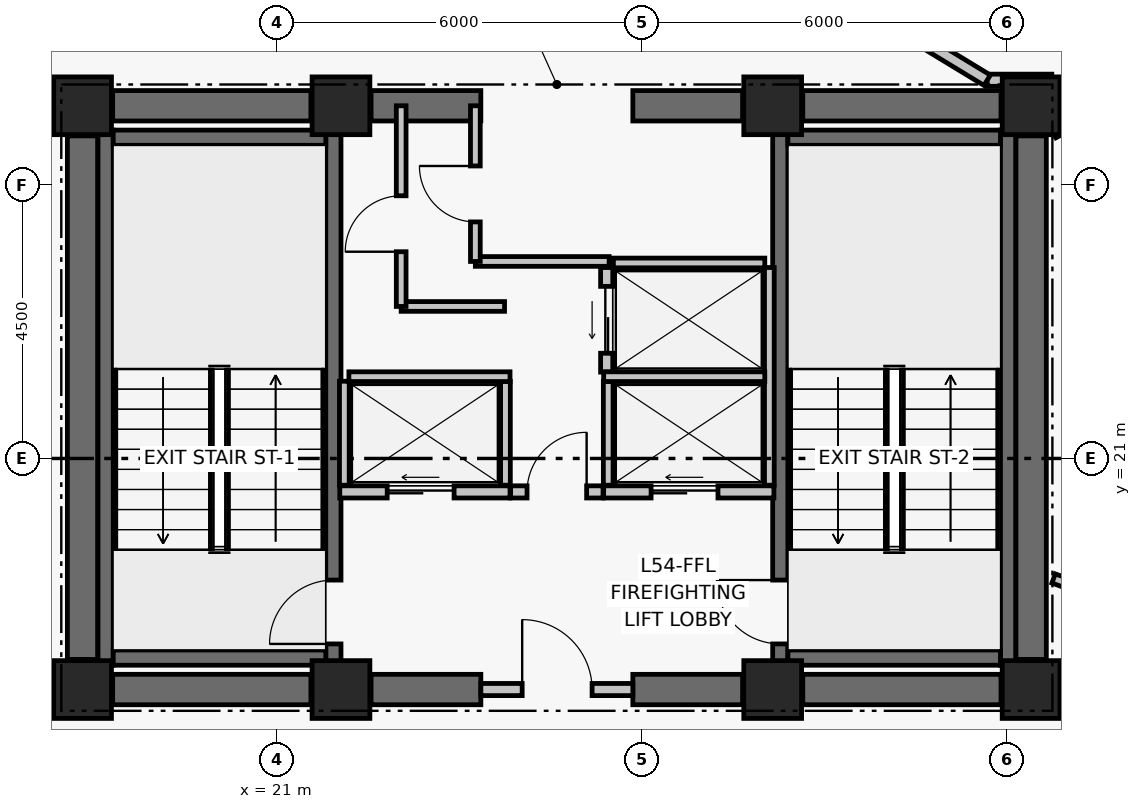
"""IFC4 building model, lengths in metres.
Left out: names, types, materials, properties, quantities, classifications, styles, units other than length and angle.
Written with IfcOpenShell. Run it as: python <this file> out.ifc"""

import sys

from ifc_helpers import new_model, si_unit, direction, frame, frame_2d, origin, origin_2d, place, context, subcontext, project, spatial, rectangle, extrude, element, fill, save


model = new_model("IFC4")
c1 = context("Model", 3, precision=1e-05, world=origin(), true_north=direction((0.0, 1.0)))
c2 = subcontext(c1, "Body", "Model", "MODEL_VIEW")
j1 = project(units=[si_unit("LENGTHUNIT", "METRE"), si_unit("PLANEANGLEUNIT", "RADIAN")], contexts=[c1])
p1 = place(None, origin())
s1 = spatial("IfcSite", under=j1, at=p1, CompositionType="ELEMENT")
p2 = place(p1, origin())
s2 = spatial("IfcBuilding", under=s1, at=p2, CompositionType="ELEMENT")
p3 = place(p2, frame((0.0, 0.0, 213.84)))
s3 = spatial("IfcBuildingStorey", under=s2, at=p3, CompositionType="ELEMENT", Elevation=213.84)
for number, where, z_axis, x_axis in (
    (1, (17.8, 17.2, 0.0), (0.0, 0.0, 1.0), (1.0, 0.0, 0.0)),
    (2, (22.05, 17.2, 0.0), (0.0, 0.0, 1.0), (1.0, 0.0, 0.0)),
    (3, (29.15, 17.2, 0.0), (0.0, 0.0, 1.0), (1.0, 0.0, 0.0)),
    (4, (33.4, 17.2, 0.0), (0.0, 0.0, 1.0), (1.0, 0.0, 0.0)),
    (5, (17.8, 26.8, 0.0), (0.0, 0.0, 1.0), (1.0, 0.0, 0.0)),
    (6, (22.05, 26.8, 0.0), (0.0, 0.0, 1.0), (1.0, 0.0, 0.0)),
    (7, (29.15, 26.8, 0.0), (0.0, 0.0, 1.0), (1.0, 0.0, 0.0)),
    (8, (33.4, 26.8, 0.0), (0.0, 0.0, 1.0), (1.0, 0.0, 0.0)),
):
    element("IfcColumn", number, at=place(p3, frame(where, z_axis=z_axis, x_axis=x_axis)), inside=s3, PredefinedType="COLUMN", context=c2, shape_type="SweptSolid", body=[
        extrude(rectangle(XDim=0.95, YDim=0.95, at=origin_2d()), origin(), (0.0, 0.0, 1.0), 5.7),
    ])
p4 = place(p3, frame((18.295, 17.2, 0.0), z_axis=(0.0, 0.0, 1.0), x_axis=(1.0, 0.0, 0.0)))
e9 = element("IfcWall", 9, at=p4, inside=s3, PredefinedType="SHEAR", context=c2, shape_type="SweptSolid", body=[
    extrude(rectangle(XDim=3.26, YDim=0.5, at=frame_2d((1.63, 0.0))), origin(), (0.0, 0.0, 1.0), 5.48),
])
p5 = place(p3, frame((22.545, 17.2, 0.0), z_axis=(0.0, 0.0, 1.0), x_axis=(1.0, 0.0, 0.0)))
e10 = element("IfcWall", 10, at=p5, inside=s3, PredefinedType="SHEAR", context=c2, shape_type="SweptSolid", body=[
    extrude(rectangle(XDim=1.805, YDim=0.5, at=frame_2d((0.903, 0.0))), origin(), (0.0, 0.0, 1.0), 5.48),
])
p6 = place(p3, frame((26.85, 17.2, 0.0), z_axis=(0.0, 0.0, 1.0), x_axis=(1.0, 0.0, 0.0)))
e11 = element("IfcWall", 11, at=p6, inside=s3, PredefinedType="SHEAR", context=c2, shape_type="SweptSolid", body=[
    extrude(rectangle(XDim=1.805, YDim=0.5, at=frame_2d((0.902, 0.0))), origin(), (0.0, 0.0, 1.0), 5.48),
])
for number, where, z_axis, x_axis in (
    (12, (29.645, 17.2, 0.0), (0.0, 0.0, 1.0), (1.0, 0.0, 0.0)),
    (13, (18.295, 26.8, 0.0), (0.0, 0.0, 1.0), (1.0, 0.0, 0.0)),
):
    element("IfcWall", number, at=place(p3, frame(where, z_axis=z_axis, x_axis=x_axis)), inside=s3, PredefinedType="SHEAR", context=c2, shape_type="SweptSolid", body=[
        extrude(rectangle(XDim=3.26, YDim=0.5, at=frame_2d((1.63, 0.0))), origin(), (0.0, 0.0, 1.0), 5.48),
    ])
p7 = place(p3, frame((22.545, 26.8, 0.0), z_axis=(0.0, 0.0, 1.0), x_axis=(1.0, 0.0, 0.0)))
e14 = element("IfcWall", 14, at=p7, inside=s3, PredefinedType="SHEAR", context=c2, shape_type="SweptSolid", body=[
    extrude(rectangle(XDim=1.805, YDim=0.5, at=frame_2d((0.903, 0.0))), origin(), (0.0, 0.0, 1.0), 5.48),
])
p8 = place(p3, frame((26.85, 26.8, 0.0), z_axis=(0.0, 0.0, 1.0), x_axis=(1.0, 0.0, 0.0)))
e15 = element("IfcWall", 15, at=p8, inside=s3, PredefinedType="SHEAR", context=c2, shape_type="SweptSolid", body=[
    extrude(rectangle(XDim=1.805, YDim=0.5, at=frame_2d((0.902, 0.0))), origin(), (0.0, 0.0, 1.0), 5.48),
])
p9 = place(p3, frame((29.645, 26.8, 0.0), z_axis=(0.0, 0.0, 1.0), x_axis=(1.0, 0.0, 0.0)))
e16 = element("IfcWall", 16, at=p9, inside=s3, PredefinedType="SHEAR", context=c2, shape_type="SweptSolid", body=[
    extrude(rectangle(XDim=3.26, YDim=0.5, at=frame_2d((1.63, 0.0))), origin(), (0.0, 0.0, 1.0), 5.48),
])
for number, where, z_axis, x_axis in (
    (17, (17.8, 17.695, 0.0), (0.0, 0.0, 1.0), (0.0, 1.0, 0.0)),
    (18, (33.4, 17.695, 0.0), (0.0, 0.0, 1.0), (0.0, 1.0, 0.0)),
):
    element("IfcWall", number, at=place(p3, frame(where, z_axis=z_axis, x_axis=x_axis)), inside=s3, PredefinedType="SHEAR", context=c2, shape_type="SweptSolid", body=[
        extrude(rectangle(XDim=8.61, YDim=0.5, at=frame_2d((4.305, 0.0))), origin(), (0.0, 0.0, 1.0), 5.48),
    ])
p10 = place(p3, frame((18.179, 17.6, 0.0), z_axis=(0.0, 0.0, 1.0), x_axis=(0.0, 1.0, 0.0)))
e19 = element("IfcWall", 19, at=p10, inside=s3, PredefinedType="SHEAR", context=c2, shape_type="SweptSolid", body=[
    extrude(rectangle(XDim=8.8, YDim=0.25, at=frame_2d((4.4, 0.0))), origin(), (0.0, 0.0, 1.0), 5.48),
])
p11 = place(p3, frame((21.925, 17.6, 0.0), z_axis=(0.0, 0.0, 1.0), x_axis=(0.0, 1.0, 0.0)))
e20 = element("IfcWall", 20, at=p11, inside=s3, PredefinedType="SHEAR", context=c2, shape_type="SweptSolid", body=[
    extrude(rectangle(XDim=8.8, YDim=0.25, at=frame_2d((4.4, 0.0))), origin(), (0.0, 0.0, 1.0), 5.48),
])
p12 = place(p11, frame((0.35, 0.0, 0.0)))
e21 = element("IfcOpeningElement", 21, at=p12, cuts=e20, PredefinedType="OPENING", context=c2, shape_type="SweptSolid", body=[
    extrude(rectangle(XDim=1.05, YDim=2.08, at=frame_2d((0.525, 1.04))), frame((0.0, 0.135, 0.0), z_axis=(0.0, -1.0, 0.0), x_axis=(1.0, 0.0, 0.0)), (0.0, 0.0, 1.0), 0.27),
])
for number, where, z_axis, x_axis in (
    (22, (18.304, 17.725, 0.0), (0.0, 0.0, 1.0), (1.0, 0.0, 0.0)),
    (23, (18.304, 26.275, 0.0), (0.0, 0.0, 1.0), (1.0, 0.0, 0.0)),
):
    element("IfcWall", number, at=place(p3, frame(where, z_axis=z_axis, x_axis=x_axis)), inside=s3, PredefinedType="SHEAR", context=c2, shape_type="SweptSolid", body=[
        extrude(rectangle(XDim=3.496, YDim=0.25, at=frame_2d((1.748, 0.0))), origin(), (0.0, 0.0, 1.0), 5.48),
    ])
p13 = place(p3, frame((29.275, 17.6, 0.0), z_axis=(0.0, 0.0, 1.0), x_axis=(0.0, 1.0, 0.0)))
e24 = element("IfcWall", 24, at=p13, inside=s3, PredefinedType="SHEAR", context=c2, shape_type="SweptSolid", body=[
    extrude(rectangle(XDim=8.8, YDim=0.25, at=frame_2d((4.4, 0.0))), origin(), (0.0, 0.0, 1.0), 5.48),
])
p14 = place(p13, frame((0.35, 0.0, 0.0)))
e25 = element("IfcOpeningElement", 25, at=p14, cuts=e24, PredefinedType="OPENING", context=c2, shape_type="SweptSolid", body=[
    extrude(rectangle(XDim=1.05, YDim=2.08, at=frame_2d((0.525, 1.04))), frame((0.0, 0.135, 0.0), z_axis=(0.0, -1.0, 0.0), x_axis=(1.0, 0.0, 0.0)), (0.0, 0.0, 1.0), 0.27),
])
p15 = place(p3, frame((33.021, 17.6, 0.0), z_axis=(0.0, 0.0, 1.0), x_axis=(0.0, 1.0, 0.0)))
e26 = element("IfcWall", 26, at=p15, inside=s3, PredefinedType="SHEAR", context=c2, shape_type="SweptSolid", body=[
    extrude(rectangle(XDim=8.8, YDim=0.25, at=frame_2d((4.4, 0.0))), origin(), (0.0, 0.0, 1.0), 5.48),
])
for number, where, z_axis, x_axis in (
    (27, (29.4, 17.725, 0.0), (0.0, 0.0, 1.0), (1.0, 0.0, 0.0)),
    (28, (29.4, 26.275, 0.0), (0.0, 0.0, 1.0), (1.0, 0.0, 0.0)),
):
    element("IfcWall", number, at=place(p3, frame(where, z_axis=z_axis, x_axis=x_axis)), inside=s3, PredefinedType="SHEAR", context=c2, shape_type="SweptSolid", body=[
        extrude(rectangle(XDim=3.496, YDim=0.25, at=frame_2d((1.748, 0.0))), origin(), (0.0, 0.0, 1.0), 5.48),
    ])
p16 = place(p3, frame((24.35, 17.2, 0.0), z_axis=(0.0, 0.0, 1.0), x_axis=(1.0, 0.0, 0.0)))
e29 = element("IfcWall", 29, at=p16, inside=s3, PredefinedType="PARTITIONING", context=c2, shape_type="SweptSolid", body=[
    extrude(rectangle(XDim=2.5, YDim=0.2, at=frame_2d((1.25, 0.0))), origin(), (0.0, 0.0, 1.0), 4.61),
])
p17 = place(p16, frame((0.68, 0.0, 0.0)))
e30 = element("IfcOpeningElement", 30, at=p17, cuts=e29, PredefinedType="OPENING", context=c2, shape_type="SweptSolid", body=[
    extrude(rectangle(XDim=1.15, YDim=2.08, at=frame_2d((0.575, 1.04))), frame((0.0, 0.11, 0.0), z_axis=(0.0, -1.0, 0.0), x_axis=(1.0, 0.0, 0.0)), (0.0, 0.0, 1.0), 0.22),
])
p18 = place(p3, frame((24.84, 20.45, 0.0), z_axis=(0.0, 0.0, 1.0), x_axis=(1.0, 0.0, 0.0)))
e31 = element("IfcWall", 31, at=p18, inside=s3, PredefinedType="PARTITIONING", context=c2, shape_type="SweptSolid", body=[
    extrude(rectangle(XDim=1.52, YDim=0.2, at=frame_2d((0.76, 0.0))), origin(), (0.0, 0.0, 1.0), 5.48),
])
p19 = place(p18, frame((0.27, 0.0, 0.0)))
e32 = element("IfcOpeningElement", 32, at=p19, cuts=e31, PredefinedType="OPENING", context=c2, shape_type="SweptSolid", body=[
    extrude(rectangle(XDim=0.98, YDim=2.06, at=frame_2d((0.49, 1.03))), frame((0.0, 0.11, 0.0), z_axis=(0.0, -1.0, 0.0), x_axis=(1.0, 0.0, 0.0)), (0.0, 0.0, 1.0), 0.22),
])
p20 = place(p3, frame((22.03, 20.45, 0.0), z_axis=(0.0, 0.0, 1.0), x_axis=(1.0, 0.0, 0.0)))
e33 = element("IfcWall", 33, at=p20, inside=s3, PredefinedType="PARTITIONING", context=c2, shape_type="SweptSolid", body=[
    extrude(rectangle(XDim=2.8, YDim=0.2, at=frame_2d((1.4, 0.0))), origin(), (0.0, 0.0, 1.0), 5.48),
])
p21 = place(p20, frame((0.78, 0.0, 0.0)))
e34 = element("IfcOpeningElement", 34, at=p21, cuts=e33, PredefinedType="OPENING", context=c2, shape_type="SweptSolid", body=[
    extrude(rectangle(XDim=1.1, YDim=2.08, at=frame_2d((0.55, 1.04))), frame((0.0, 0.11, 0.0), z_axis=(0.0, -1.0, 0.0), x_axis=(1.0, 0.0, 0.0)), (0.0, 0.0, 1.0), 0.22),
])
p22 = place(p3, frame((26.37, 20.45, 0.0), z_axis=(0.0, 0.0, 1.0), x_axis=(1.0, 0.0, 0.0)))
e35 = element("IfcWall", 35, at=p22, inside=s3, PredefinedType="PARTITIONING", context=c2, shape_type="SweptSolid", body=[
    extrude(rectangle(XDim=2.8, YDim=0.2, at=frame_2d((1.4, 0.0))), origin(), (0.0, 0.0, 1.0), 5.48),
])
p23 = place(p22, frame((0.78, 0.0, 0.0)))
e36 = element("IfcOpeningElement", 36, at=p23, cuts=e35, PredefinedType="OPENING", context=c2, shape_type="SweptSolid", body=[
    extrude(rectangle(XDim=1.1, YDim=2.08, at=frame_2d((0.55, 1.04))), frame((0.0, 0.11, 0.0), z_axis=(0.0, -1.0, 0.0), x_axis=(1.0, 0.0, 0.0)), (0.0, 0.0, 1.0), 0.22),
])
p24 = place(p3, frame((26.42, 22.42, 0.0), z_axis=(0.0, 0.0, 1.0), x_axis=(0.0, 1.0, 0.0)))
e37 = element("IfcWall", 37, at=p24, inside=s3, PredefinedType="PARTITIONING", context=c2, shape_type="SweptSolid", body=[
    extrude(rectangle(XDim=1.72, YDim=0.2, at=frame_2d((0.86, 0.0))), origin(), (0.0, 0.0, 1.0), 5.48),
])
p25 = place(p24, frame((0.31, 0.0, 0.0)))
e38 = element("IfcOpeningElement", 38, at=p25, cuts=e37, PredefinedType="OPENING", context=c2, shape_type="SweptSolid", body=[
    extrude(rectangle(XDim=1.1, YDim=2.08, at=frame_2d((0.55, 1.04))), frame((0.0, 0.11, 0.0), z_axis=(0.0, -1.0, 0.0), x_axis=(1.0, 0.0, 0.0)), (0.0, 0.0, 1.0), 0.22),
])
for number, where, z_axis, x_axis in (
    (39, (22.105, 20.56, 0.0), (0.0, 0.0, 1.0), (0.0, 1.0, 0.0)),
    (40, (24.755, 20.56, 0.0), (0.0, 0.0, 1.0), (0.0, 1.0, 0.0)),
):
    element("IfcWall", number, at=place(p3, frame(where, z_axis=z_axis, x_axis=x_axis)), inside=s3, PredefinedType="PARTITIONING", context=c2, shape_type="SweptSolid", body=[
        extrude(rectangle(XDim=1.71, YDim=0.16, at=frame_2d((0.855, 0.0))), origin(), (0.0, 0.0, 1.0), 5.48),
    ])
p26 = place(p3, frame((22.18, 22.345, 0.0), z_axis=(0.0, 0.0, 1.0), x_axis=(1.0, 0.0, 0.0)))
e41 = element("IfcWall", 41, at=p26, inside=s3, PredefinedType="PARTITIONING", context=c2, shape_type="SweptSolid", body=[
    extrude(rectangle(XDim=2.65, YDim=0.16, at=frame_2d((1.325, 0.0))), origin(), (0.0, 0.0, 1.0), 5.48),
])
p27 = place(p3, frame((29.095, 20.56, 0.0), z_axis=(0.0, 0.0, 1.0), x_axis=(0.0, 1.0, 0.0)))
e42 = element("IfcWall", 42, at=p27, inside=s3, PredefinedType="PARTITIONING", context=c2, shape_type="SweptSolid", body=[
    extrude(rectangle(XDim=3.58, YDim=0.16, at=frame_2d((1.79, 0.0))), origin(), (0.0, 0.0, 1.0), 5.48),
])
p28 = place(p3, frame((26.445, 20.56, 0.0), z_axis=(0.0, 0.0, 1.0), x_axis=(0.0, 1.0, 0.0)))
e43 = element("IfcWall", 43, at=p28, inside=s3, PredefinedType="PARTITIONING", context=c2, shape_type="SweptSolid", body=[
    extrude(rectangle(XDim=1.71, YDim=0.16, at=frame_2d((0.855, 0.0))), origin(), (0.0, 0.0, 1.0), 5.48),
])
p29 = place(p3, frame((26.37, 22.345, 0.0), z_axis=(0.0, 0.0, 1.0), x_axis=(1.0, 0.0, 0.0)))
e44 = element("IfcWall", 44, at=p29, inside=s3, PredefinedType="PARTITIONING", context=c2, shape_type="SweptSolid", body=[
    extrude(rectangle(XDim=2.65, YDim=0.16, at=frame_2d((1.325, 0.0))), origin(), (0.0, 0.0, 1.0), 5.48),
])
p30 = place(p3, frame((26.53, 24.215, 0.0), z_axis=(0.0, 0.0, 1.0), x_axis=(1.0, 0.0, 0.0)))
e45 = element("IfcWall", 45, at=p30, inside=s3, PredefinedType="PARTITIONING", context=c2, shape_type="SweptSolid", body=[
    extrude(rectangle(XDim=2.49, YDim=0.16, at=frame_2d((1.245, 0.0))), origin(), (0.0, 0.0, 1.0), 5.48),
])
p31 = place(p3, frame((23.04, 23.5, 0.0), z_axis=(0.0, 0.0, 1.0), x_axis=(1.0, 0.0, 0.0)))
e46 = element("IfcWall", 46, at=p31, inside=s3, PredefinedType="PARTITIONING", context=c2, shape_type="SweptSolid", body=[
    extrude(rectangle(XDim=1.7, YDim=0.16, at=frame_2d((0.85, 0.0))), origin(), (0.0, 0.0, 1.0), 5.48),
])
p32 = place(p3, frame((23.04, 23.5, 0.0), z_axis=(0.0, 0.0, 1.0), x_axis=(0.0, 1.0, 0.0)))
e47 = element("IfcWall", 47, at=p32, inside=s3, PredefinedType="PARTITIONING", context=c2, shape_type="SweptSolid", body=[
    extrude(rectangle(XDim=3.3, YDim=0.16, at=frame_2d((1.65, 0.0))), origin(), (0.0, 0.0, 1.0), 4.61),
])
p33 = place(p32, frame((0.9, 0.0, 0.0)))
e48 = element("IfcOpeningElement", 48, at=p33, cuts=e47, PredefinedType="OPENING", context=c2, shape_type="SweptSolid", body=[
    extrude(rectangle(XDim=0.92, YDim=2.05, at=frame_2d((0.46, 1.025))), frame((0.0, 0.09, 0.0), z_axis=(0.0, -1.0, 0.0), x_axis=(1.0, 0.0, 0.0)), (0.0, 0.0, 1.0), 0.18),
])
p34 = place(p3, frame((24.26, 24.24, 0.0), z_axis=(0.0, 0.0, 1.0), x_axis=(1.0, 0.0, 0.0)))
e49 = element("IfcWall", 49, at=p34, inside=s3, PredefinedType="PARTITIONING", context=c2, shape_type="SweptSolid", body=[
    extrude(rectangle(XDim=2.2, YDim=0.16, at=frame_2d((1.1, 0.0))), origin(), (0.0, 0.0, 1.0), 5.48),
])
p35 = place(p3, frame((24.26, 24.24, 0.0), z_axis=(0.0, 0.0, 1.0), x_axis=(0.0, 1.0, 0.0)))
e50 = element("IfcWall", 50, at=p35, inside=s3, PredefinedType="PARTITIONING", context=c2, shape_type="SweptSolid", body=[
    extrude(rectangle(XDim=2.56, YDim=0.16, at=frame_2d((1.28, 0.0))), origin(), (0.0, 0.0, 1.0), 4.61),
])
p36 = place(p35, frame((0.65, 0.0, 0.0)))
e51 = element("IfcOpeningElement", 51, at=p36, cuts=e50, PredefinedType="OPENING", context=c2, shape_type="SweptSolid", body=[
    extrude(rectangle(XDim=0.92, YDim=2.05, at=frame_2d((0.46, 1.025))), frame((0.0, 0.09, 0.0), z_axis=(0.0, -1.0, 0.0), x_axis=(1.0, 0.0, 0.0)), (0.0, 0.0, 1.0), 0.18),
])
p37 = place(p3, frame((33.74, 27.22, 0.0), z_axis=(0.0, 0.0, 1.0), x_axis=(-1.0, 0.0, 0.0)))
e52 = element("IfcWall", 52, at=p37, inside=s3, PredefinedType="PARTITIONING", context=c2, shape_type="SweptSolid", body=[
    extrude(rectangle(XDim=1.062, YDim=0.2, at=frame_2d((0.531, 0.0))), origin(), (0.0, 0.0, 1.0), 4.61),
])
p38 = place(p3, frame((32.677, 27.22, 0.0), z_axis=(0.0, 0.0, 1.0), x_axis=(-0.854662977584, 0.519183199601, 0.0)))
e53 = element("IfcWall", 53, at=p38, inside=s3, PredefinedType="PARTITIONING", context=c2, shape_type="SweptSolid", body=[
    extrude(rectangle(XDim=2.982, YDim=0.2, at=frame_2d((1.491, 0.0))), origin(), (0.0, 0.0, 1.0), 4.61),
])
p39 = place(p3, frame((33.77, 26.344, 0.0), z_axis=(0.0, 0.0, 1.0), x_axis=(0.882914984083, 0.469532885837, 0.0)))
e54 = element("IfcWall", 54, at=p39, inside=s3, PredefinedType="PARTITIONING", context=c2, shape_type="SweptSolid", body=[
    extrude(rectangle(XDim=2.174, YDim=0.16, at=frame_2d((1.087, 0.0))), origin(), (0.0, 0.0, 1.0), 4.61),
])
p40 = place(p3, frame((33.77, 19.026, 0.0), z_axis=(0.0, 0.0, 1.0), x_axis=(0.93969706172, -0.342007941714, 0.0)))
e55 = element("IfcWall", 55, at=p40, inside=s3, PredefinedType="PARTITIONING", context=c2, shape_type="SweptSolid", body=[
    extrude(rectangle(XDim=3.552, YDim=0.16, at=frame_2d((1.776, 0.0))), origin(), (0.0, 0.0, 1.0), 4.61),
])
p41 = place(p12, origin())
e56 = element("IfcDoor", 56, at=p41, inside=s3, OperationType="SINGLE_SWING_LEFT", PredefinedType="DOOR", context=c2, shape_type="SweptSolid", body=[
    extrude(rectangle(XDim=1.05, YDim=2.08, at=frame_2d((0.525, 1.04))), frame((0.0, 0.025, 0.0), z_axis=(0.0, -1.0, 0.0), x_axis=(1.0, 0.0, 0.0)), (0.0, 0.0, 1.0), 0.05),
])
fill(e21, e56)
p42 = place(p14, origin())
e57 = element("IfcDoor", 57, at=p42, inside=s3, OperationType="SINGLE_SWING_RIGHT", PredefinedType="DOOR", context=c2, shape_type="SweptSolid", body=[
    extrude(rectangle(XDim=1.05, YDim=2.08, at=frame_2d((0.525, 1.04))), frame((0.0, 0.025, 0.0), z_axis=(0.0, -1.0, 0.0), x_axis=(1.0, 0.0, 0.0)), (0.0, 0.0, 1.0), 0.05),
])
fill(e25, e57)
p43 = place(p17, origin())
e58 = element("IfcDoor", 58, at=p43, inside=s3, OperationType="SINGLE_SWING_LEFT", PredefinedType="DOOR", context=c2, shape_type="SweptSolid", body=[
    extrude(rectangle(XDim=1.15, YDim=2.08, at=frame_2d((0.575, 1.04))), frame((0.0, 0.025, 0.0), z_axis=(0.0, -1.0, 0.0), x_axis=(1.0, 0.0, 0.0)), (0.0, 0.0, 1.0), 0.05),
])
fill(e30, e58)
p44 = place(p19, origin())
e59 = element("IfcDoor", 59, at=p44, inside=s3, OperationType="SINGLE_SWING_RIGHT", PredefinedType="DOOR", context=c2, shape_type="SweptSolid", body=[
    extrude(rectangle(XDim=0.98, YDim=2.06, at=frame_2d((0.49, 1.03))), frame((0.0, 0.025, 0.0), z_axis=(0.0, -1.0, 0.0), x_axis=(1.0, 0.0, 0.0)), (0.0, 0.0, 1.0), 0.05),
])
fill(e32, e59)
p45 = place(p21, origin())
e60 = element("IfcDoor", 60, at=p45, inside=s3, OperationType="DOUBLE_DOOR_SLIDING", PredefinedType="DOOR", context=c2, shape_type="SweptSolid", body=[
    extrude(rectangle(XDim=1.1, YDim=2.08, at=frame_2d((0.55, 1.04))), frame((0.0, 0.025, 0.0), z_axis=(0.0, -1.0, 0.0), x_axis=(1.0, 0.0, 0.0)), (0.0, 0.0, 1.0), 0.05),
])
fill(e34, e60)
p46 = place(p23, origin())
e61 = element("IfcDoor", 61, at=p46, inside=s3, OperationType="DOUBLE_DOOR_SLIDING", PredefinedType="DOOR", context=c2, shape_type="SweptSolid", body=[
    extrude(rectangle(XDim=1.1, YDim=2.08, at=frame_2d((0.55, 1.04))), frame((0.0, 0.025, 0.0), z_axis=(0.0, -1.0, 0.0), x_axis=(1.0, 0.0, 0.0)), (0.0, 0.0, 1.0), 0.05),
])
fill(e36, e61)
p47 = place(p25, origin())
e62 = element("IfcDoor", 62, at=p47, inside=s3, OperationType="DOUBLE_DOOR_SLIDING", PredefinedType="DOOR", context=c2, shape_type="SweptSolid", body=[
    extrude(rectangle(XDim=1.1, YDim=2.08, at=frame_2d((0.55, 1.04))), frame((0.0, 0.025, 0.0), z_axis=(0.0, -1.0, 0.0), x_axis=(1.0, 0.0, 0.0)), (0.0, 0.0, 1.0), 0.05),
])
fill(e38, e62)
p48 = place(p33, origin())
e63 = element("IfcDoor", 63, at=p48, inside=s3, OperationType="SINGLE_SWING_LEFT", PredefinedType="DOOR", context=c2, shape_type="SweptSolid", body=[
    extrude(rectangle(XDim=0.92, YDim=2.05, at=frame_2d((0.46, 1.025))), frame((0.0, 0.025, 0.0), z_axis=(0.0, -1.0, 0.0), x_axis=(1.0, 0.0, 0.0)), (0.0, 0.0, 1.0), 0.05),
])
fill(e48, e63)
p49 = place(p36, origin())
e64 = element("IfcDoor", 64, at=p49, inside=s3, OperationType="SINGLE_SWING_RIGHT", PredefinedType="DOOR", context=c2, shape_type="SweptSolid", body=[
    extrude(rectangle(XDim=0.92, YDim=2.05, at=frame_2d((0.46, 1.025))), frame((0.0, 0.025, 0.0), z_axis=(0.0, -1.0, 0.0), x_axis=(1.0, 0.0, 0.0)), (0.0, 0.0, 1.0), 0.05),
])
fill(e51, e64)
save(model, sys.argv[1])
